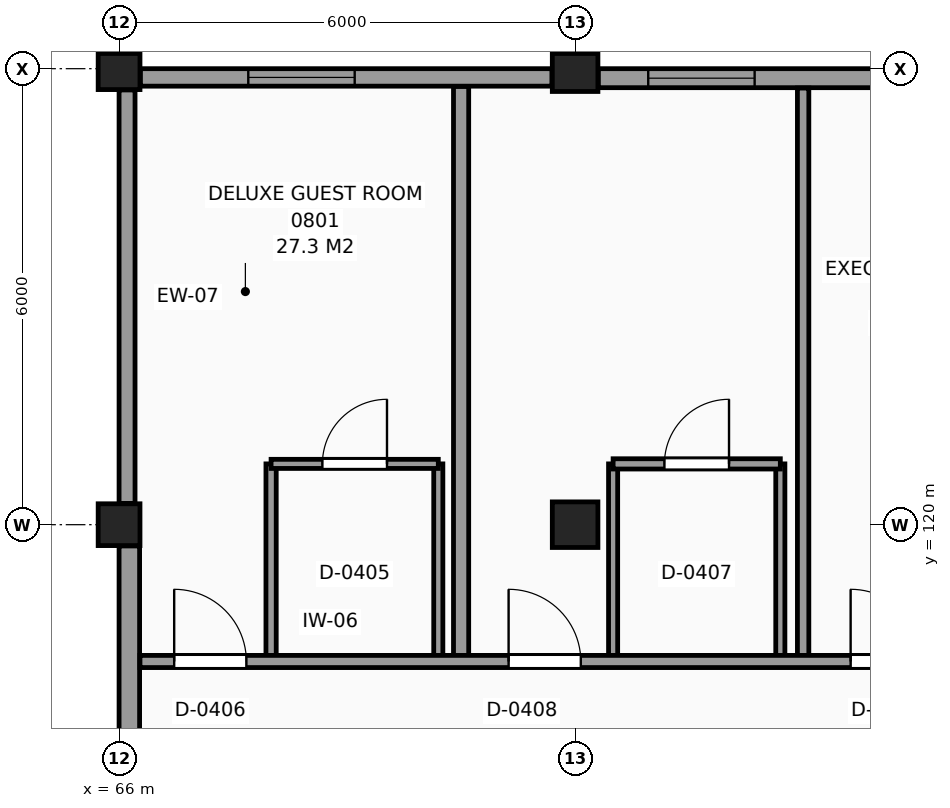
"""IFC4 building model, lengths in metres.
Left out: names, types, materials, properties, quantities, classifications, styles, units other than length and angle.
Written with IfcOpenShell. Run it as: python <this file> out.ifc"""

import sys

from ifc_helpers import new_model, si_unit, direction, frame, frame_2d, origin, origin_2d, place, context, subcontext, project, spatial, rectangle, extrude, element, fill, save


model = new_model("IFC4")
c1 = context("Model", 3, precision=1e-05, world=origin(), true_north=direction((0.0, 1.0)))
c2 = subcontext(c1, "Body", "Model", "MODEL_VIEW")
j1 = project(units=[si_unit("LENGTHUNIT", "METRE"), si_unit("PLANEANGLEUNIT", "RADIAN")], contexts=[c1])
p1 = place(None, origin())
s1 = spatial("IfcSite", under=j1, at=p1, CompositionType="ELEMENT")
p2 = place(p1, origin())
s2 = spatial("IfcBuilding", under=s1, at=p2, CompositionType="ELEMENT")
p3 = place(p2, frame((0.0, 0.0, 34.8)))
s3 = spatial("IfcBuildingStorey", under=s2, at=p3, CompositionType="ELEMENT", Elevation=34.8)
for number, where, z_axis, x_axis in (
    (1, (66.0, 120.0, 0.0), (0.0, 0.0, 1.0), (1.0, 0.0, 0.0)),
    (2, (66.0, 126.0, 0.0), (0.0, 0.0, 1.0), (1.0, 0.0, 0.0)),
):
    element("IfcColumn", number, at=place(p3, frame(where, z_axis=z_axis, x_axis=x_axis)), inside=s3, PredefinedType="COLUMN", context=c2, shape_type="SweptSolid", body=[
        extrude(rectangle(XDim=0.55, YDim=0.55, at=origin_2d()), origin(), (0.0, 0.0, 1.0), 3.3),
    ])
for number, where, z_axis, x_axis in (
    (3, (72.0, 120.0, 0.0), (0.0, 0.0, 1.0), (1.0, 0.0, 0.0)),
    (4, (72.0, 126.0, 0.0), (0.0, 0.0, 1.0), (1.0, 0.0, 0.0)),
):
    element("IfcColumn", number, at=place(p3, frame(where, z_axis=z_axis, x_axis=x_axis)), inside=s3, PredefinedType="COLUMN", context=c2, shape_type="SweptSolid", body=[
        extrude(rectangle(XDim=0.6, YDim=0.6, at=origin_2d()), origin(), (0.0, 0.0, 1.0), 3.3),
    ])
p4 = place(p3, frame((77.72, 125.875, 0.0), z_axis=(0.0, 0.0, 1.0), x_axis=(-1.0, 0.0, 0.0)))
e5 = element("IfcWall", 5, at=p4, inside=s3, PredefinedType="SOLIDWALL", context=c2, shape_type="SweptSolid", body=[
    extrude(rectangle(XDim=5.415, YDim=0.25, at=frame_2d((2.708, 0.0))), origin(), (0.0, 0.0, 1.0), 2.445),
])
p5 = place(p4, frame((3.358, 0.0, 0.8)))
e6 = element("IfcOpeningElement", 6, at=p5, cuts=e5, PredefinedType="OPENING", context=c2, shape_type="SweptSolid", body=[
    extrude(rectangle(XDim=1.4, YDim=1.4, at=frame_2d((0.7, 0.7))), frame((0.0, 0.135, 0.0), z_axis=(0.0, -1.0, 0.0), x_axis=(1.0, 0.0, 0.0)), (0.0, 0.0, 1.0), 0.27),
])
p6 = place(p3, frame((71.695, 125.885, 0.0), z_axis=(0.0, 0.0, 1.0), x_axis=(-1.0, 0.0, 0.0)))
e7 = element("IfcWall", 7, at=p6, inside=s3, PredefinedType="SOLIDWALL", context=c2, shape_type="SweptSolid", body=[
    extrude(rectangle(XDim=5.415, YDim=0.23, at=frame_2d((2.708, 0.0))), origin(), (0.0, 0.0, 1.0), 2.445),
])
p7 = place(p6, frame((2.595, 0.0, 0.8)))
e8 = element("IfcOpeningElement", 8, at=p7, cuts=e7, PredefinedType="OPENING", context=c2, shape_type="SweptSolid", body=[
    extrude(rectangle(XDim=1.4, YDim=1.4, at=frame_2d((0.7, 0.7))), frame((0.0, 0.125, 0.0), z_axis=(0.0, -1.0, 0.0), x_axis=(1.0, 0.0, 0.0)), (0.0, 0.0, 1.0), 0.25),
])
p8 = place(p3, frame((66.105, 125.72, 0.0), z_axis=(0.0, 0.0, 1.0), x_axis=(0.0, -1.0, 0.0)))
e9 = element("IfcWall", 9, at=p8, inside=s3, PredefinedType="SOLIDWALL", context=c2, shape_type="SweptSolid", body=[
    extrude(rectangle(XDim=5.44, YDim=0.21, at=frame_2d((2.72, 0.0))), origin(), (0.0, 0.0, 1.0), 2.295),
])
p9 = place(p3, frame((66.135, 119.72, 0.0), z_axis=(0.0, 0.0, 1.0), x_axis=(0.0, -1.0, 0.0)))
e10 = element("IfcWall", 10, at=p9, inside=s3, PredefinedType="SOLIDWALL", context=c2, shape_type="SweptSolid", body=[
    extrude(rectangle(XDim=5.44, YDim=0.27, at=frame_2d((2.72, 0.0))), origin(), (0.0, 0.0, 1.0), 2.295),
])
p10 = place(p3, frame((68.0, 118.2, 0.0), z_axis=(0.0, 0.0, 1.0), x_axis=(0.0, 1.0, 0.0)))
e11 = element("IfcWall", 11, at=p10, inside=s3, PredefinedType="PARTITIONING", context=c2, shape_type="SweptSolid", body=[
    extrude(rectangle(XDim=2.6, YDim=0.135, at=frame_2d((1.3, 0.0))), origin(), (0.0, 0.0, 1.0), 3.07),
])
p11 = place(p3, frame((70.2, 118.2, 0.0), z_axis=(0.0, 0.0, 1.0), x_axis=(0.0, 1.0, 0.0)))
e12 = element("IfcWall", 12, at=p11, inside=s3, PredefinedType="PARTITIONING", context=c2, shape_type="SweptSolid", body=[
    extrude(rectangle(XDim=2.6, YDim=0.12, at=frame_2d((1.3, 0.0))), origin(), (0.0, 0.0, 1.0), 3.07),
])
p12 = place(p3, frame((70.5, 118.2, 0.0), z_axis=(0.0, 0.0, 1.0), x_axis=(0.0, 1.0, 0.0)))
e13 = element("IfcWall", 13, at=p12, inside=s3, PredefinedType="PARTITIONING", context=c2, shape_type="SweptSolid", body=[
    extrude(rectangle(XDim=7.565, YDim=0.2, at=frame_2d((3.782, 0.0))), origin(), (0.0, 0.0, 1.0), 3.07),
])
for number, where, z_axis, x_axis in (
    (14, (72.5, 118.2, 0.0), (0.0, 0.0, 1.0), (0.0, 1.0, 0.0)),
    (15, (74.7, 118.2, 0.0), (0.0, 0.0, 1.0), (0.0, 1.0, 0.0)),
):
    element("IfcWall", number, at=place(p3, frame(where, z_axis=z_axis, x_axis=x_axis)), inside=s3, PredefinedType="PARTITIONING", context=c2, shape_type="SweptSolid", body=[
        extrude(rectangle(XDim=2.6, YDim=0.12, at=frame_2d((1.3, 0.0))), origin(), (0.0, 0.0, 1.0), 3.07),
    ])
p13 = place(p3, frame((75.0, 118.2, 0.0), z_axis=(0.0, 0.0, 1.0), x_axis=(0.0, 1.0, 0.0)))
e16 = element("IfcWall", 16, at=p13, inside=s3, PredefinedType="PARTITIONING", context=c2, shape_type="SweptSolid", body=[
    extrude(rectangle(XDim=7.545, YDim=0.15, at=frame_2d((3.772, 0.0))), origin(), (0.0, 0.0, 1.0), 3.07),
])
p14 = place(p3, frame((66.275, 118.2, 0.0), z_axis=(0.0, 0.0, 1.0), x_axis=(1.0, 0.0, 0.0)))
e17 = element("IfcWall", 17, at=p14, inside=s3, PredefinedType="PARTITIONING", context=c2, shape_type="SweptSolid", body=[
    extrude(rectangle(XDim=110.225, YDim=0.16, at=frame_2d((55.113, 0.0))), origin(), (0.0, 0.0, 1.0), 3.07),
])
p15 = place(p14, frame((0.45, 0.0, 0.0)))
e18 = element("IfcOpeningElement", 18, at=p15, cuts=e17, PredefinedType="OPENING", context=c2, shape_type="SweptSolid", body=[
    extrude(rectangle(XDim=0.95, YDim=2.1, at=frame_2d((0.475, 1.05))), frame((0.0, 0.09, 0.0), z_axis=(0.0, -1.0, 0.0), x_axis=(1.0, 0.0, 0.0)), (0.0, 0.0, 1.0), 0.18),
])
p16 = place(p14, frame((4.85, 0.0, 0.0)))
e19 = element("IfcOpeningElement", 19, at=p16, cuts=e17, PredefinedType="OPENING", context=c2, shape_type="SweptSolid", body=[
    extrude(rectangle(XDim=0.95, YDim=2.1, at=frame_2d((0.475, 1.05))), frame((0.0, 0.09, 0.0), z_axis=(0.0, -1.0, 0.0), x_axis=(1.0, 0.0, 0.0)), (0.0, 0.0, 1.0), 0.18),
])
p17 = place(p14, frame((9.35, 0.0, 0.0)))
e20 = element("IfcOpeningElement", 20, at=p17, cuts=e17, PredefinedType="OPENING", context=c2, shape_type="SweptSolid", body=[
    extrude(rectangle(XDim=0.95, YDim=2.1, at=frame_2d((0.475, 1.05))), frame((0.0, 0.09, 0.0), z_axis=(0.0, -1.0, 0.0), x_axis=(1.0, 0.0, 0.0)), (0.0, 0.0, 1.0), 0.18),
])
p18 = place(p14, frame((18.45, 0.0, 0.0)))
e21 = element("IfcOpeningElement", 21, at=p18, cuts=e17, PredefinedType="OPENING", context=c2, shape_type="SweptSolid", body=[
    extrude(rectangle(XDim=0.95, YDim=2.1, at=frame_2d((0.475, 1.05))), frame((0.0, 0.09, 0.0), z_axis=(0.0, -1.0, 0.0), x_axis=(1.0, 0.0, 0.0)), (0.0, 0.0, 1.0), 0.18),
])
p19 = place(p14, frame((22.85, 0.0, 0.0)))
e22 = element("IfcOpeningElement", 22, at=p19, cuts=e17, PredefinedType="OPENING", context=c2, shape_type="SweptSolid", body=[
    extrude(rectangle(XDim=0.95, YDim=2.1, at=frame_2d((0.475, 1.05))), frame((0.0, 0.09, 0.0), z_axis=(0.0, -1.0, 0.0), x_axis=(1.0, 0.0, 0.0)), (0.0, 0.0, 1.0), 0.18),
])
p20 = place(p14, frame((27.35, 0.0, 0.0)))
e23 = element("IfcOpeningElement", 23, at=p20, cuts=e17, PredefinedType="OPENING", context=c2, shape_type="SweptSolid", body=[
    extrude(rectangle(XDim=0.95, YDim=2.1, at=frame_2d((0.475, 1.05))), frame((0.0, 0.09, 0.0), z_axis=(0.0, -1.0, 0.0), x_axis=(1.0, 0.0, 0.0)), (0.0, 0.0, 1.0), 0.18),
])
p21 = place(p14, frame((42.05, 0.0, 0.0)))
e24 = element("IfcOpeningElement", 24, at=p21, cuts=e17, PredefinedType="OPENING", context=c2, shape_type="SweptSolid", body=[
    extrude(rectangle(XDim=0.95, YDim=2.1, at=frame_2d((0.475, 1.05))), frame((0.0, 0.09, 0.0), z_axis=(0.0, -1.0, 0.0), x_axis=(1.0, 0.0, 0.0)), (0.0, 0.0, 1.0), 0.18),
])
p22 = place(p14, frame((50.3, 0.0, 0.0)))
e25 = element("IfcOpeningElement", 25, at=p22, cuts=e17, PredefinedType="OPENING", context=c2, shape_type="SweptSolid", body=[
    extrude(rectangle(XDim=0.95, YDim=2.1, at=frame_2d((0.475, 1.05))), frame((0.0, 0.09, 0.0), z_axis=(0.0, -1.0, 0.0), x_axis=(1.0, 0.0, 0.0)), (0.0, 0.0, 1.0), 0.18),
])
p23 = place(p14, frame((52.85, 0.0, 0.0)))
e26 = element("IfcOpeningElement", 26, at=p23, cuts=e17, PredefinedType="OPENING", context=c2, shape_type="SweptSolid", body=[
    extrude(rectangle(XDim=0.95, YDim=2.1, at=frame_2d((0.475, 1.05))), frame((0.0, 0.09, 0.0), z_axis=(0.0, -1.0, 0.0), x_axis=(1.0, 0.0, 0.0)), (0.0, 0.0, 1.0), 0.18),
])
p24 = place(p14, frame((60.05, 0.0, 0.0)))
e27 = element("IfcOpeningElement", 27, at=p24, cuts=e17, PredefinedType="OPENING", context=c2, shape_type="SweptSolid", body=[
    extrude(rectangle(XDim=0.95, YDim=2.1, at=frame_2d((0.475, 1.05))), frame((0.0, 0.09, 0.0), z_axis=(0.0, -1.0, 0.0), x_axis=(1.0, 0.0, 0.0)), (0.0, 0.0, 1.0), 0.18),
])
p25 = place(p14, frame((64.25, 0.0, 0.0)))
e28 = element("IfcOpeningElement", 28, at=p25, cuts=e17, PredefinedType="OPENING", context=c2, shape_type="SweptSolid", body=[
    extrude(rectangle(XDim=0.95, YDim=2.1, at=frame_2d((0.475, 1.05))), frame((0.0, 0.09, 0.0), z_axis=(0.0, -1.0, 0.0), x_axis=(1.0, 0.0, 0.0)), (0.0, 0.0, 1.0), 0.18),
])
p26 = place(p14, frame((66.45, 0.0, 0.0)))
e29 = element("IfcOpeningElement", 29, at=p26, cuts=e17, PredefinedType="OPENING", context=c2, shape_type="SweptSolid", body=[
    extrude(rectangle(XDim=0.95, YDim=2.1, at=frame_2d((0.475, 1.05))), frame((0.0, 0.09, 0.0), z_axis=(0.0, -1.0, 0.0), x_axis=(1.0, 0.0, 0.0)), (0.0, 0.0, 1.0), 0.18),
])
p27 = place(p14, frame((72.45, 0.0, 0.0)))
e30 = element("IfcOpeningElement", 30, at=p27, cuts=e17, PredefinedType="OPENING", context=c2, shape_type="SweptSolid", body=[
    extrude(rectangle(XDim=0.95, YDim=2.1, at=frame_2d((0.475, 1.05))), frame((0.0, 0.09, 0.0), z_axis=(0.0, -1.0, 0.0), x_axis=(1.0, 0.0, 0.0)), (0.0, 0.0, 1.0), 0.18),
])
p28 = place(p14, frame((82.25, 0.0, 0.0)))
e31 = element("IfcOpeningElement", 31, at=p28, cuts=e17, PredefinedType="OPENING", context=c2, shape_type="SweptSolid", body=[
    extrude(rectangle(XDim=0.95, YDim=2.1, at=frame_2d((0.475, 1.05))), frame((0.0, 0.09, 0.0), z_axis=(0.0, -1.0, 0.0), x_axis=(1.0, 0.0, 0.0)), (0.0, 0.0, 1.0), 0.18),
])
p29 = place(p14, frame((84.45, 0.0, 0.0)))
e32 = element("IfcOpeningElement", 32, at=p29, cuts=e17, PredefinedType="OPENING", context=c2, shape_type="SweptSolid", body=[
    extrude(rectangle(XDim=0.95, YDim=2.1, at=frame_2d((0.475, 1.05))), frame((0.0, 0.09, 0.0), z_axis=(0.0, -1.0, 0.0), x_axis=(1.0, 0.0, 0.0)), (0.0, 0.0, 1.0), 0.18),
])
p30 = place(p14, frame((88.85, 0.0, 0.0)))
e33 = element("IfcOpeningElement", 33, at=p30, cuts=e17, PredefinedType="OPENING", context=c2, shape_type="SweptSolid", body=[
    extrude(rectangle(XDim=0.95, YDim=2.1, at=frame_2d((0.475, 1.05))), frame((0.0, 0.09, 0.0), z_axis=(0.0, -1.0, 0.0), x_axis=(1.0, 0.0, 0.0)), (0.0, 0.0, 1.0), 0.18),
])
p31 = place(p14, frame((96.05, 0.0, 0.0)))
e34 = element("IfcOpeningElement", 34, at=p31, cuts=e17, PredefinedType="OPENING", context=c2, shape_type="SweptSolid", body=[
    extrude(rectangle(XDim=0.95, YDim=2.1, at=frame_2d((0.475, 1.05))), frame((0.0, 0.09, 0.0), z_axis=(0.0, -1.0, 0.0), x_axis=(1.0, 0.0, 0.0)), (0.0, 0.0, 1.0), 0.18),
])
p32 = place(p14, frame((104.3, 0.0, 0.0)))
e35 = element("IfcOpeningElement", 35, at=p32, cuts=e17, PredefinedType="OPENING", context=c2, shape_type="SweptSolid", body=[
    extrude(rectangle(XDim=0.95, YDim=2.1, at=frame_2d((0.475, 1.05))), frame((0.0, 0.09, 0.0), z_axis=(0.0, -1.0, 0.0), x_axis=(1.0, 0.0, 0.0)), (0.0, 0.0, 1.0), 0.18),
])
p33 = place(p14, frame((108.45, 0.0, 0.0)))
e36 = element("IfcOpeningElement", 36, at=p33, cuts=e17, PredefinedType="OPENING", context=c2, shape_type="SweptSolid", body=[
    extrude(rectangle(XDim=0.95, YDim=2.1, at=frame_2d((0.475, 1.05))), frame((0.0, 0.09, 0.0), z_axis=(0.0, -1.0, 0.0), x_axis=(1.0, 0.0, 0.0)), (0.0, 0.0, 1.0), 0.18),
])
p34 = place(p3, frame((68.0, 120.8, 0.0), z_axis=(0.0, 0.0, 1.0), x_axis=(1.0, 0.0, 0.0)))
e37 = element("IfcWall", 37, at=p34, inside=s3, PredefinedType="PARTITIONING", context=c2, shape_type="SweptSolid", body=[
    extrude(rectangle(XDim=2.2, YDim=0.12, at=frame_2d((1.1, 0.0))), origin(), (0.0, 0.0, 1.0), 3.07),
])
p35 = place(p34, frame((0.675, 0.0, 0.0)))
e38 = element("IfcOpeningElement", 38, at=p35, cuts=e37, PredefinedType="OPENING", context=c2, shape_type="SweptSolid", body=[
    extrude(rectangle(XDim=0.85, YDim=2.1, at=frame_2d((0.425, 1.05))), frame((0.0, 0.07, 0.0), z_axis=(0.0, -1.0, 0.0), x_axis=(1.0, 0.0, 0.0)), (0.0, 0.0, 1.0), 0.14),
])
p36 = place(p3, frame((72.5, 120.8, 0.0), z_axis=(0.0, 0.0, 1.0), x_axis=(1.0, 0.0, 0.0)))
e39 = element("IfcWall", 39, at=p36, inside=s3, PredefinedType="PARTITIONING", context=c2, shape_type="SweptSolid", body=[
    extrude(rectangle(XDim=2.2, YDim=0.135, at=frame_2d((1.1, 0.0))), origin(), (0.0, 0.0, 1.0), 3.07),
])
p37 = place(p36, frame((0.675, 0.0, 0.0)))
e40 = element("IfcOpeningElement", 40, at=p37, cuts=e39, PredefinedType="OPENING", context=c2, shape_type="SweptSolid", body=[
    extrude(rectangle(XDim=0.85, YDim=2.1, at=frame_2d((0.425, 1.05))), frame((0.0, 0.078, 0.0), z_axis=(0.0, -1.0, 0.0), x_axis=(1.0, 0.0, 0.0)), (0.0, 0.0, 1.0), 0.155),
])
p38 = place(p7, origin())
e41 = element("IfcWindow", 41, at=p38, inside=s3, PartitioningType="SINGLE_PANEL", PredefinedType="WINDOW", context=c2, shape_type="SweptSolid", body=[
    extrude(rectangle(XDim=1.4, YDim=1.4, at=frame_2d((0.7, 0.7))), frame((0.0, 0.03, 0.0), z_axis=(0.0, -1.0, 0.0), x_axis=(1.0, 0.0, 0.0)), (0.0, 0.0, 1.0), 0.06),
])
fill(e8, e41)
p39 = place(p5, origin())
e42 = element("IfcWindow", 42, at=p39, inside=s3, PartitioningType="SINGLE_PANEL", PredefinedType="WINDOW", context=c2, shape_type="SweptSolid", body=[
    extrude(rectangle(XDim=1.4, YDim=1.4, at=frame_2d((0.7, 0.7))), frame((0.0, 0.03, 0.0), z_axis=(0.0, -1.0, 0.0), x_axis=(1.0, 0.0, 0.0)), (0.0, 0.0, 1.0), 0.06),
])
fill(e6, e42)
p40 = place(p35, origin())
e43 = element("IfcDoor", 43, at=p40, inside=s3, OperationType="SINGLE_SWING_RIGHT", PredefinedType="DOOR", context=c2, shape_type="SweptSolid", body=[
    extrude(rectangle(XDim=0.85, YDim=2.1, at=frame_2d((0.425, 1.05))), frame((0.0, 0.025, 0.0), z_axis=(0.0, -1.0, 0.0), x_axis=(1.0, 0.0, 0.0)), (0.0, 0.0, 1.0), 0.05),
])
fill(e38, e43)
p41 = place(p15, origin())
e44 = element("IfcDoor", 44, at=p41, inside=s3, OperationType="SINGLE_SWING_LEFT", PredefinedType="DOOR", context=c2, shape_type="SweptSolid", body=[
    extrude(rectangle(XDim=0.95, YDim=2.1, at=frame_2d((0.475, 1.05))), frame((0.0, 0.025, 0.0), z_axis=(0.0, -1.0, 0.0), x_axis=(1.0, 0.0, 0.0)), (0.0, 0.0, 1.0), 0.05),
])
fill(e18, e44)
p42 = place(p37, origin())
e45 = element("IfcDoor", 45, at=p42, inside=s3, OperationType="SINGLE_SWING_RIGHT", PredefinedType="DOOR", context=c2, shape_type="SweptSolid", body=[
    extrude(rectangle(XDim=0.85, YDim=2.1, at=frame_2d((0.425, 1.05))), frame((0.0, 0.025, 0.0), z_axis=(0.0, -1.0, 0.0), x_axis=(1.0, 0.0, 0.0)), (0.0, 0.0, 1.0), 0.05),
])
fill(e40, e45)
p43 = place(p16, origin())
e46 = element("IfcDoor", 46, at=p43, inside=s3, OperationType="SINGLE_SWING_LEFT", PredefinedType="DOOR", context=c2, shape_type="SweptSolid", body=[
    extrude(rectangle(XDim=0.95, YDim=2.1, at=frame_2d((0.475, 1.05))), frame((0.0, 0.025, 0.0), z_axis=(0.0, -1.0, 0.0), x_axis=(1.0, 0.0, 0.0)), (0.0, 0.0, 1.0), 0.05),
])
fill(e19, e46)
p44 = place(p17, origin())
e47 = element("IfcDoor", 47, at=p44, inside=s3, OperationType="SINGLE_SWING_LEFT", PredefinedType="DOOR", context=c2, shape_type="SweptSolid", body=[
    extrude(rectangle(XDim=0.95, YDim=2.1, at=frame_2d((0.475, 1.05))), frame((0.0, 0.025, 0.0), z_axis=(0.0, -1.0, 0.0), x_axis=(1.0, 0.0, 0.0)), (0.0, 0.0, 1.0), 0.05),
])
fill(e20, e47)
save(model, sys.argv[1])
